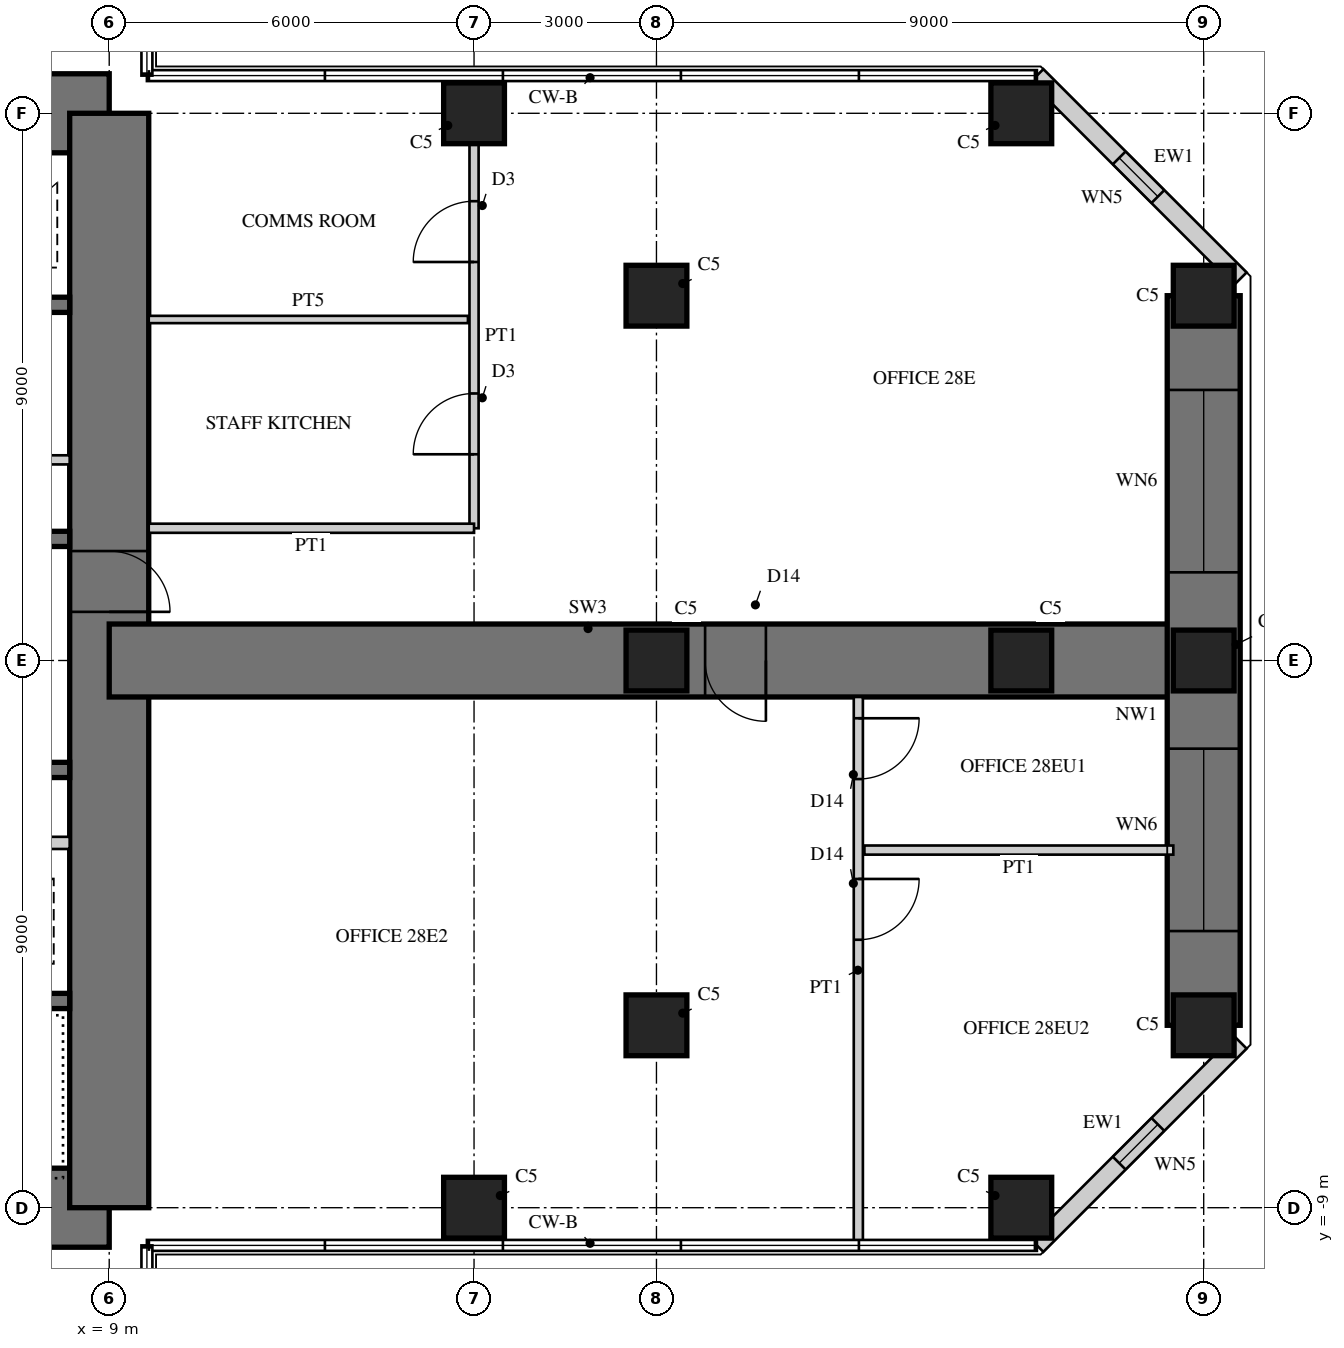
"""IFC4 building model, lengths in metres.
Left out: names, types, materials, properties, quantities, classifications, styles, units other than length and angle.
Written with IfcOpenShell. Run it as: python <this file> out.ifc"""

import sys

from ifc_helpers import new_model, si_unit, direction, frame, frame_2d, origin, origin_2d, place, context, subcontext, project, spatial, rectangle, hollow_rectangle, extrude, element, fill, save


model = new_model("IFC4")
c1 = context("Model", 3, precision=1e-05, world=origin(), true_north=direction((0.0, 1.0)))
c2 = subcontext(c1, "Body", "Model", "MODEL_VIEW")
j1 = project(units=[si_unit("LENGTHUNIT", "METRE"), si_unit("PLANEANGLEUNIT", "RADIAN")], contexts=[c1])
p1 = place(None, origin())
s1 = spatial("IfcSite", under=j1, at=p1, CompositionType="ELEMENT")
p2 = place(p1, origin())
s2 = spatial("IfcBuilding", under=s1, at=p2, CompositionType="ELEMENT")
p3 = place(p2, frame((0.0, 0.0, 116.5)))
s3 = spatial("IfcBuildingStorey", under=s2, at=p3, CompositionType="ELEMENT", Elevation=116.5)
p4 = place(p3, frame((9.0, 9.0, 0.0), z_axis=(0.0, 0.0, 1.0), x_axis=(-1.0, 0.0, 0.0)))
e1 = element("IfcWall", 1, at=p4, inside=s3, PredefinedType="SHEAR", context=c2, shape_type="SweptSolid", body=[
    extrude(rectangle(XDim=18.0, YDim=1.3, at=frame_2d((9.0, 0.0))), origin(), (0.0, 0.0, 1.0), 4.0),
])
p5 = place(p4, frame((9.8, 0.0, 0.0)))
e2 = element("IfcOpeningElement", 2, at=p5, cuts=e1, PredefinedType="OPENING", context=c2, shape_type="SweptSolid", body=[
    extrude(rectangle(XDim=1.0, YDim=2.4, at=frame_2d((0.5, 1.2))), frame((0.0, 0.66, 0.0), z_axis=(0.0, -1.0, 0.0), x_axis=(1.0, 0.0, 0.0)), (0.0, 0.0, 1.0), 1.32),
])
p6 = place(p3, frame((-9.0, -9.0, 0.0), z_axis=(0.0, 0.0, 1.0), x_axis=(1.0, 0.0, 0.0)))
e3 = element("IfcWall", 3, at=p6, inside=s3, PredefinedType="SHEAR", context=c2, shape_type="SweptSolid", body=[
    extrude(rectangle(XDim=18.0, YDim=1.3, at=frame_2d((9.0, 0.0))), origin(), (0.0, 0.0, 1.0), 4.0),
])
p7 = place(p6, frame((9.8, 0.0, 0.0)))
e4 = element("IfcOpeningElement", 4, at=p7, cuts=e3, PredefinedType="OPENING", context=c2, shape_type="SweptSolid", body=[
    extrude(rectangle(XDim=1.0, YDim=2.4, at=frame_2d((0.5, 1.2))), frame((0.0, 0.66, 0.0), z_axis=(0.0, -1.0, 0.0), x_axis=(1.0, 0.0, 0.0)), (0.0, 0.0, 1.0), 1.32),
])
p8 = place(p3, frame((9.0, -9.0, 0.0), z_axis=(0.0, 0.0, 1.0), x_axis=(0.0, 1.0, 0.0)))
e5 = element("IfcWall", 5, at=p8, inside=s3, PredefinedType="SHEAR", context=c2, shape_type="SweptSolid", body=[
    extrude(rectangle(XDim=18.0, YDim=1.3, at=frame_2d((9.0, 0.0))), origin(), (0.0, 0.0, 1.0), 4.0),
])
p9 = place(p8, frame((9.8, 0.0, 0.0)))
e6 = element("IfcOpeningElement", 6, at=p9, cuts=e5, PredefinedType="OPENING", context=c2, shape_type="SweptSolid", body=[
    extrude(rectangle(XDim=1.0, YDim=2.4, at=frame_2d((0.5, 1.2))), frame((0.0, 0.66, 0.0), z_axis=(0.0, -1.0, 0.0), x_axis=(1.0, 0.0, 0.0)), (0.0, 0.0, 1.0), 1.32),
])
p10 = place(p3, frame((1.925, 2.0, 0.0), z_axis=(0.0, 0.0, 1.0), x_axis=(1.0, 0.0, 0.0)))
e7 = element("IfcWall", 7, at=p10, inside=s3, PredefinedType="SHEAR", context=c2, shape_type="SweptSolid", body=[
    extrude(rectangle(XDim=6.425, YDim=0.25, at=frame_2d((3.212, 0.0))), origin(), (0.0, 0.0, 1.0), 4.0),
])
p11 = place(p3, frame((1.925, 5.85, 0.0), z_axis=(0.0, 0.0, 1.0), x_axis=(1.0, 0.0, 0.0)))
e8 = element("IfcWall", 8, at=p11, inside=s3, PredefinedType="SHEAR", context=c2, shape_type="SweptSolid", body=[
    extrude(rectangle(XDim=6.425, YDim=0.25, at=frame_2d((3.212, 0.0))), origin(), (0.0, 0.0, 1.0), 4.0),
])
p12 = place(p11, frame((0.454, 0.0, 0.0)))
e9 = element("IfcOpeningElement", 9, at=p12, cuts=e8, PredefinedType="OPENING", context=c2, shape_type="SweptSolid", body=[
    extrude(rectangle(XDim=1.1, YDim=2.2, at=frame_2d((0.55, 1.1))), frame((0.0, 0.135, 0.0), z_axis=(0.0, -1.0, 0.0), x_axis=(1.0, 0.0, 0.0)), (0.0, 0.0, 1.0), 0.27),
])
p13 = place(p11, frame((2.663, 0.0, 0.0)))
e10 = element("IfcOpeningElement", 10, at=p13, cuts=e8, PredefinedType="OPENING", context=c2, shape_type="SweptSolid", body=[
    extrude(rectangle(XDim=1.1, YDim=2.2, at=frame_2d((0.55, 1.1))), frame((0.0, 0.135, 0.0), z_axis=(0.0, -1.0, 0.0), x_axis=(1.0, 0.0, 0.0)), (0.0, 0.0, 1.0), 0.27),
])
p14 = place(p11, frame((4.871, 0.0, 0.0)))
e11 = element("IfcOpeningElement", 11, at=p14, cuts=e8, PredefinedType="OPENING", context=c2, shape_type="SweptSolid", body=[
    extrude(rectangle(XDim=1.1, YDim=2.2, at=frame_2d((0.55, 1.1))), frame((0.0, 0.135, 0.0), z_axis=(0.0, -1.0, 0.0), x_axis=(1.0, 0.0, 0.0)), (0.0, 0.0, 1.0), 0.27),
])
p15 = place(p3, frame((1.925, 3.3, 0.0), z_axis=(0.0, 0.0, 1.0), x_axis=(1.0, 0.0, 0.0)))
e12 = element("IfcWall", 12, at=p15, inside=s3, PredefinedType="PARTITIONING", context=c2, shape_type="SweptSolid", body=[
    extrude(rectangle(XDim=6.425, YDim=0.15, at=frame_2d((3.212, 0.0))), origin(), (0.0, 0.0, 1.0), 4.0),
])
p16 = place(p15, frame((0.075, 0.0, 0.0)))
e13 = element("IfcOpeningElement", 13, at=p16, cuts=e12, PredefinedType="OPENING", context=c2, shape_type="SweptSolid", body=[
    extrude(rectangle(XDim=0.8, YDim=2.1, at=frame_2d((0.4, 1.05))), frame((0.0, 0.085, 0.0), z_axis=(0.0, -1.0, 0.0), x_axis=(1.0, 0.0, 0.0)), (0.0, 0.0, 1.0), 0.17),
])
p17 = place(p15, frame((3.675, 0.0, 0.0)))
e14 = element("IfcOpeningElement", 14, at=p17, cuts=e12, PredefinedType="OPENING", context=c2, shape_type="SweptSolid", body=[
    extrude(rectangle(XDim=0.8, YDim=2.1, at=frame_2d((0.4, 1.05))), frame((0.0, 0.085, 0.0), z_axis=(0.0, -1.0, 0.0), x_axis=(1.0, 0.0, 0.0)), (0.0, 0.0, 1.0), 0.17),
])
p18 = place(p3, frame((2.125, -1.8, 0.0), z_axis=(0.0, 0.0, 1.0), x_axis=(1.0, 0.0, 0.0)))
e15 = element("IfcWall", 15, at=p18, inside=s3, PredefinedType="SHEAR", context=c2, shape_type="SweptSolid", body=[
    extrude(rectangle(XDim=6.225, YDim=0.25, at=frame_2d((3.113, 0.0))), origin(), (0.0, 0.0, 1.0), 4.0),
])
p19 = place(p3, frame((2.125, -5.6, 0.0), z_axis=(0.0, 0.0, 1.0), x_axis=(1.0, 0.0, 0.0)))
e16 = element("IfcWall", 16, at=p19, inside=s3, PredefinedType="SHEAR", context=c2, shape_type="SweptSolid", body=[
    extrude(rectangle(XDim=6.225, YDim=0.25, at=frame_2d((3.113, 0.0))), origin(), (0.0, 0.0, 1.0), 4.0),
])
p20 = place(p19, frame((0.175, 0.0, 0.0)))
e17 = element("IfcOpeningElement", 17, at=p20, cuts=e16, PredefinedType="OPENING", context=c2, shape_type="SweptSolid", body=[
    extrude(rectangle(XDim=1.0, YDim=2.1, at=frame_2d((0.5, 1.05))), frame((0.0, 0.135, 0.0), z_axis=(0.0, -1.0, 0.0), x_axis=(1.0, 0.0, 0.0)), (0.0, 0.0, 1.0), 0.27),
])
p21 = place(p3, frame((5.725, -3.0, 0.0), z_axis=(0.0, 0.0, 1.0), x_axis=(1.0, 0.0, 0.0)))
e18 = element("IfcWall", 18, at=p21, inside=s3, PredefinedType="PARTITIONING", context=c2, shape_type="SweptSolid", body=[
    extrude(rectangle(XDim=2.625, YDim=0.2, at=frame_2d((1.312, 0.0))), origin(), (0.0, 0.0, 1.0), 4.0),
])
p22 = place(p3, frame((9.0, 0.0, 0.0), z_axis=(0.0, 0.0, 1.0), x_axis=(1.0, 0.0, 0.0)))
e19 = element("IfcWall", 19, at=p22, inside=s3, PredefinedType="SHEAR", context=c2, shape_type="SweptSolid", body=[
    extrude(rectangle(XDim=18.0, YDim=1.2, at=frame_2d((9.0, 0.0))), origin(), (0.0, 0.0, 1.0), 4.0),
])
p23 = place(p22, frame((9.8, 0.0, 0.0)))
e20 = element("IfcOpeningElement", 20, at=p23, cuts=e19, PredefinedType="OPENING", context=c2, shape_type="SweptSolid", body=[
    extrude(rectangle(XDim=1.0, YDim=2.2, at=frame_2d((0.5, 1.1))), frame((0.0, 0.61, 0.0), z_axis=(0.0, -1.0, 0.0), x_axis=(1.0, 0.0, 0.0)), (0.0, 0.0, 1.0), 1.22),
])
p24 = place(p3, frame((27.0, -6.0, 0.0), z_axis=(0.0, 0.0, 1.0), x_axis=(0.0, 1.0, 0.0)))
e21 = element("IfcWall", 21, at=p24, inside=s3, PredefinedType="SHEAR", context=c2, shape_type="SweptSolid", body=[
    extrude(rectangle(XDim=12.0, YDim=1.2, at=frame_2d((6.0, 0.0))), origin(), (0.0, 0.0, 1.0), 4.0),
])
p25 = place(p24, frame((1.55, 0.0, 0.6)))
e22 = element("IfcOpeningElement", 22, at=p25, cuts=e21, PredefinedType="OPENING", context=c2, shape_type="SweptSolid", body=[
    extrude(rectangle(XDim=3.0, YDim=2.4, at=frame_2d((1.5, 1.2))), frame((0.0, 0.61, 0.0), z_axis=(0.0, -1.0, 0.0), x_axis=(1.0, 0.0, 0.0)), (0.0, 0.0, 1.0), 1.22),
])
p26 = place(p24, frame((7.45, 0.0, 0.6)))
e23 = element("IfcOpeningElement", 23, at=p26, cuts=e21, PredefinedType="OPENING", context=c2, shape_type="SweptSolid", body=[
    extrude(rectangle(XDim=3.0, YDim=2.4, at=frame_2d((1.5, 1.2))), frame((0.0, 0.61, 0.0), z_axis=(0.0, -1.0, 0.0), x_axis=(1.0, 0.0, 0.0)), (0.0, 0.0, 1.0), 1.22),
])
for number, where, z_axis, x_axis in (
    (24, (15.0, -9.0, 0.0), (0.0, 0.0, 1.0), (1.0, 0.0, 0.0)),
    (25, (24.0, -9.0, 0.0), (0.0, 0.0, 1.0), (1.0, 0.0, 0.0)),
    (26, (15.0, 9.0, 0.0), (0.0, 0.0, 1.0), (1.0, 0.0, 0.0)),
    (27, (24.0, 9.0, 0.0), (0.0, 0.0, 1.0), (1.0, 0.0, 0.0)),
    (28, (27.0, -6.0, 0.0), (0.0, 0.0, 1.0), (1.0, 0.0, 0.0)),
    (29, (27.0, 0.0, 0.0), (0.0, 0.0, 1.0), (1.0, 0.0, 0.0)),
    (30, (27.0, 6.0, 0.0), (0.0, 0.0, 1.0), (1.0, 0.0, 0.0)),
    (31, (18.0, -6.0, 0.0), (0.0, 0.0, 1.0), (1.0, 0.0, 0.0)),
    (32, (18.0, 0.0, 0.0), (0.0, 0.0, 1.0), (1.0, 0.0, 0.0)),
    (33, (18.0, 6.0, 0.0), (0.0, 0.0, 1.0), (1.0, 0.0, 0.0)),
    (34, (24.0, 0.0, 0.0), (0.0, 0.0, 1.0), (1.0, 0.0, 0.0)),
):
    element("IfcColumn", number, at=place(p3, frame(where, z_axis=z_axis, x_axis=x_axis)), inside=s3, PredefinedType="COLUMN", context=c2, shape_type="SweptSolid", body=[
        extrude(rectangle(XDim=1.0, YDim=1.0, at=origin_2d()), origin(), (0.0, 0.0, 1.0), 4.0),
    ])
p27 = place(p3, frame((24.257, -9.62, 0.0), z_axis=(0.0, 0.0, 1.0), x_axis=(0.707106781187, 0.707106781187, 0.0)))
e35 = element("IfcWall", 35, at=p27, inside=s3, PredefinedType="SOLIDWALL", context=c2, shape_type="SweptSolid", body=[
    extrude(rectangle(XDim=4.728, YDim=0.3, at=frame_2d((2.364, 0.0))), origin(), (0.0, 0.0, 1.0), 3.8),
])
p28 = place(p27, frame((1.914, 0.0, 0.3)))
e36 = element("IfcOpeningElement", 36, at=p28, cuts=e35, PredefinedType="OPENING", context=c2, shape_type="SweptSolid", body=[
    extrude(rectangle(XDim=0.9, YDim=2.4, at=frame_2d((0.45, 1.2))), frame((0.0, 0.16, 0.0), z_axis=(0.0, -1.0, 0.0), x_axis=(1.0, 0.0, 0.0)), (0.0, 0.0, 1.0), 0.32),
])
p29 = place(p3, frame((27.6, 6.277, 0.0), z_axis=(0.0, 0.0, 1.0), x_axis=(-0.707106781187, 0.707106781187, 0.0)))
e37 = element("IfcWall", 37, at=p29, inside=s3, PredefinedType="SOLIDWALL", context=c2, shape_type="SweptSolid", body=[
    extrude(rectangle(XDim=4.728, YDim=0.3, at=frame_2d((2.364, 0.0))), origin(), (0.0, 0.0, 1.0), 3.8),
])
p30 = place(p29, frame((1.914, 0.0, 0.3)))
e38 = element("IfcOpeningElement", 38, at=p30, cuts=e37, PredefinedType="OPENING", context=c2, shape_type="SweptSolid", body=[
    extrude(rectangle(XDim=0.9, YDim=2.4, at=frame_2d((0.45, 1.2))), frame((0.0, 0.16, 0.0), z_axis=(0.0, -1.0, 0.0), x_axis=(1.0, 0.0, 0.0)), (0.0, 0.0, 1.0), 0.32),
])
p31 = place(p3, frame((15.0, 2.175, 0.0), z_axis=(0.0, 0.0, 1.0), x_axis=(0.0, 1.0, 0.0)))
e39 = element("IfcWall", 39, at=p31, inside=s3, PredefinedType="PARTITIONING", context=c2, shape_type="SweptSolid", body=[
    extrude(rectangle(XDim=6.325, YDim=0.15, at=frame_2d((3.163, 0.0))), origin(), (0.0, 0.0, 1.0), 3.0),
])
p32 = place(p31, frame((1.217, 0.0, 0.0)))
e40 = element("IfcOpeningElement", 40, at=p32, cuts=e39, PredefinedType="OPENING", context=c2, shape_type="SweptSolid", body=[
    extrude(rectangle(XDim=1.0, YDim=2.1, at=frame_2d((0.5, 1.05))), frame((0.0, 0.085, 0.0), z_axis=(0.0, -1.0, 0.0), x_axis=(1.0, 0.0, 0.0)), (0.0, 0.0, 1.0), 0.17),
])
p33 = place(p31, frame((4.379, 0.0, 0.0)))
e41 = element("IfcOpeningElement", 41, at=p33, cuts=e39, PredefinedType="OPENING", context=c2, shape_type="SweptSolid", body=[
    extrude(rectangle(XDim=1.0, YDim=2.1, at=frame_2d((0.5, 1.05))), frame((0.0, 0.085, 0.0), z_axis=(0.0, -1.0, 0.0), x_axis=(1.0, 0.0, 0.0)), (0.0, 0.0, 1.0), 0.17),
])
p34 = place(p3, frame((9.65, 2.175, 0.0), z_axis=(0.0, 0.0, 1.0), x_axis=(1.0, 0.0, 0.0)))
e42 = element("IfcWall", 42, at=p34, inside=s3, PredefinedType="PARTITIONING", context=c2, shape_type="SweptSolid", body=[
    extrude(rectangle(XDim=5.35, YDim=0.15, at=frame_2d((2.675, 0.0))), origin(), (0.0, 0.0, 1.0), 3.8),
])
p35 = place(p3, frame((9.65, 5.609, 0.0), z_axis=(0.0, 0.0, 1.0), x_axis=(1.0, 0.0, 0.0)))
e43 = element("IfcWall", 43, at=p35, inside=s3, PredefinedType="PLUMBINGWALL", context=c2, shape_type="SweptSolid", body=[
    extrude(rectangle(XDim=5.25, YDim=0.12, at=frame_2d((2.625, 0.0))), origin(), (0.0, 0.0, 1.0), 3.8),
])
p36 = place(p3, frame((21.42, -3.118, 0.0), z_axis=(0.0, 0.0, 1.0), x_axis=(1.0, 0.0, 0.0)))
e44 = element("IfcWall", 44, at=p36, inside=s3, PredefinedType="PARTITIONING", context=c2, shape_type="SweptSolid", body=[
    extrude(rectangle(XDim=5.08, YDim=0.15, at=frame_2d((2.54, 0.0))), origin(), (0.0, 0.0, 1.0), 3.8),
])
p37 = place(p3, frame((21.32, -9.58, 0.0), z_axis=(0.0, 0.0, 1.0), x_axis=(0.0, 1.0, 0.0)))
e45 = element("IfcWall", 45, at=p37, inside=s3, PredefinedType="PARTITIONING", context=c2, shape_type="SweptSolid", body=[
    extrude(rectangle(XDim=8.98, YDim=0.15, at=frame_2d((4.49, 0.0))), origin(), (0.0, 0.0, 1.0), 3.8),
])
p38 = place(p37, frame((4.987, 0.0, 0.0)))
e46 = element("IfcOpeningElement", 46, at=p38, cuts=e45, PredefinedType="OPENING", context=c2, shape_type="SweptSolid", body=[
    extrude(rectangle(XDim=1.0, YDim=2.2, at=frame_2d((0.5, 1.1))), frame((0.0, 0.085, 0.0), z_axis=(0.0, -1.0, 0.0), x_axis=(1.0, 0.0, 0.0)), (0.0, 0.0, 1.0), 0.17),
])
p39 = place(p37, frame((7.63, 0.0, 0.0)))
e47 = element("IfcOpeningElement", 47, at=p39, cuts=e45, PredefinedType="OPENING", context=c2, shape_type="SweptSolid", body=[
    extrude(rectangle(XDim=1.0, YDim=2.2, at=frame_2d((0.5, 1.1))), frame((0.0, 0.085, 0.0), z_axis=(0.0, -1.0, 0.0), x_axis=(1.0, 0.0, 0.0)), (0.0, 0.0, 1.0), 0.17),
])
p40 = place(p28, origin())
e48 = element("IfcWindow", 48, at=p40, inside=s3, PartitioningType="SINGLE_PANEL", PredefinedType="WINDOW", context=c2, shape_type="SweptSolid", body=[
    extrude(hollow_rectangle(XDim=0.9, YDim=2.4, WallThickness=0.06, at=frame_2d((0.45, 1.2))), frame((0.0, 0.03, 0.0), z_axis=(0.0, -1.0, 0.0), x_axis=(1.0, 0.0, 0.0)), (0.0, 0.0, 1.0), 0.06),
    extrude(rectangle(XDim=0.779, YDim=2.279, at=frame_2d((0.45, 1.2))), frame((0.0, 0.03, 0.0), z_axis=(0.0, -1.0, 0.0), x_axis=(1.0, 0.0, 0.0)), (0.0, 0.0, 1.0), 0.06),
])
fill(e36, e48)
p41 = place(p25, origin())
e49 = element("IfcWindow", 49, at=p41, inside=s3, PartitioningType="SINGLE_PANEL", PredefinedType="WINDOW", context=c2, shape_type="SweptSolid", body=[
    extrude(hollow_rectangle(XDim=3.0, YDim=2.4, WallThickness=0.06, at=frame_2d((1.5, 1.2))), frame((0.0, 0.03, 0.0), z_axis=(0.0, -1.0, 0.0), x_axis=(1.0, 0.0, 0.0)), (0.0, 0.0, 1.0), 0.06),
    extrude(rectangle(XDim=2.879, YDim=2.279, at=frame_2d((1.5, 1.2))), frame((0.0, 0.03, 0.0), z_axis=(0.0, -1.0, 0.0), x_axis=(1.0, 0.0, 0.0)), (0.0, 0.0, 1.0), 0.06),
])
fill(e22, e49)
p42 = place(p26, origin())
e50 = element("IfcWindow", 50, at=p42, inside=s3, PartitioningType="SINGLE_PANEL", PredefinedType="WINDOW", context=c2, shape_type="SweptSolid", body=[
    extrude(hollow_rectangle(XDim=3.0, YDim=2.4, WallThickness=0.06, at=frame_2d((1.5, 1.2))), frame((0.0, 0.03, 0.0), z_axis=(0.0, -1.0, 0.0), x_axis=(1.0, 0.0, 0.0)), (0.0, 0.0, 1.0), 0.06),
    extrude(rectangle(XDim=2.879, YDim=2.279, at=frame_2d((1.5, 1.2))), frame((0.0, 0.03, 0.0), z_axis=(0.0, -1.0, 0.0), x_axis=(1.0, 0.0, 0.0)), (0.0, 0.0, 1.0), 0.06),
])
fill(e23, e50)
p43 = place(p30, origin())
e51 = element("IfcWindow", 51, at=p43, inside=s3, PartitioningType="SINGLE_PANEL", PredefinedType="WINDOW", context=c2, shape_type="SweptSolid", body=[
    extrude(hollow_rectangle(XDim=0.9, YDim=2.4, WallThickness=0.06, at=frame_2d((0.45, 1.2))), frame((0.0, 0.03, 0.0), z_axis=(0.0, -1.0, 0.0), x_axis=(1.0, 0.0, 0.0)), (0.0, 0.0, 1.0), 0.06),
    extrude(rectangle(XDim=0.779, YDim=2.279, at=frame_2d((0.45, 1.2))), frame((0.0, 0.03, 0.0), z_axis=(0.0, -1.0, 0.0), x_axis=(1.0, 0.0, 0.0)), (0.0, 0.0, 1.0), 0.06),
])
fill(e38, e51)
p44 = place(p32, origin())
e52 = element("IfcDoor", 52, at=p44, inside=s3, OperationType="SINGLE_SWING_LEFT", PredefinedType="DOOR", context=c2, shape_type="SweptSolid", body=[
    extrude(rectangle(XDim=1.0, YDim=2.1, at=frame_2d((0.5, 1.05))), frame((0.0, 0.025, 0.0), z_axis=(0.0, -1.0, 0.0), x_axis=(1.0, 0.0, 0.0)), (0.0, 0.0, 1.0), 0.05),
])
fill(e40, e52)
p45 = place(p33, origin())
e53 = element("IfcDoor", 53, at=p45, inside=s3, OperationType="SINGLE_SWING_LEFT", PredefinedType="DOOR", context=c2, shape_type="SweptSolid", body=[
    extrude(rectangle(XDim=1.0, YDim=2.1, at=frame_2d((0.5, 1.05))), frame((0.0, 0.025, 0.0), z_axis=(0.0, -1.0, 0.0), x_axis=(1.0, 0.0, 0.0)), (0.0, 0.0, 1.0), 0.05),
])
fill(e41, e53)
p46 = place(p38, frame((1.0, 0.0, 0.0), z_axis=(0.0, 0.0, 1.0), x_axis=(-1.0, 0.0, 0.0)))
e54 = element("IfcDoor", 54, at=p46, inside=s3, OperationType="SINGLE_SWING_LEFT", PredefinedType="DOOR", context=c2, shape_type="SweptSolid", body=[
    extrude(rectangle(XDim=1.0, YDim=2.2, at=frame_2d((0.5, 1.1))), frame((0.0, 0.025, 0.0), z_axis=(0.0, -1.0, 0.0), x_axis=(1.0, 0.0, 0.0)), (0.0, 0.0, 1.0), 0.05),
])
fill(e46, e54)
p47 = place(p39, frame((1.0, 0.0, 0.0), z_axis=(0.0, 0.0, 1.0), x_axis=(-1.0, 0.0, 0.0)))
e55 = element("IfcDoor", 55, at=p47, inside=s3, OperationType="SINGLE_SWING_LEFT", PredefinedType="DOOR", context=c2, shape_type="SweptSolid", body=[
    extrude(rectangle(XDim=1.0, YDim=2.2, at=frame_2d((0.5, 1.1))), frame((0.0, 0.025, 0.0), z_axis=(0.0, -1.0, 0.0), x_axis=(1.0, 0.0, 0.0)), (0.0, 0.0, 1.0), 0.05),
])
fill(e47, e55)
p48 = place(p23, frame((1.0, 0.0, 0.0), z_axis=(0.0, 0.0, 1.0), x_axis=(-1.0, 0.0, 0.0)))
e56 = element("IfcDoor", 56, at=p48, inside=s3, OperationType="SINGLE_SWING_LEFT", PredefinedType="DOOR", context=c2, shape_type="SweptSolid", body=[
    extrude(rectangle(XDim=1.0, YDim=2.2, at=frame_2d((0.5, 1.1))), frame((0.0, 0.025, 0.0), z_axis=(0.0, -1.0, 0.0), x_axis=(1.0, 0.0, 0.0)), (0.0, 0.0, 1.0), 0.05),
])
fill(e20, e56)
p49 = place(p9, frame((1.0, 0.0, 0.0), z_axis=(0.0, 0.0, 1.0), x_axis=(-1.0, 0.0, 0.0)))
e57 = element("IfcDoor", 57, at=p49, inside=s3, OperationType="SINGLE_SWING_RIGHT", PredefinedType="DOOR", context=c2, shape_type="SweptSolid", body=[
    extrude(rectangle(XDim=1.0, YDim=2.4, at=frame_2d((0.5, 1.2))), frame((0.0, -0.005, 0.0), z_axis=(0.0, -1.0, 0.0), x_axis=(1.0, 0.0, 0.0)), (0.0, 0.0, 1.0), 0.05),
])
fill(e6, e57)
save(model, sys.argv[1])
